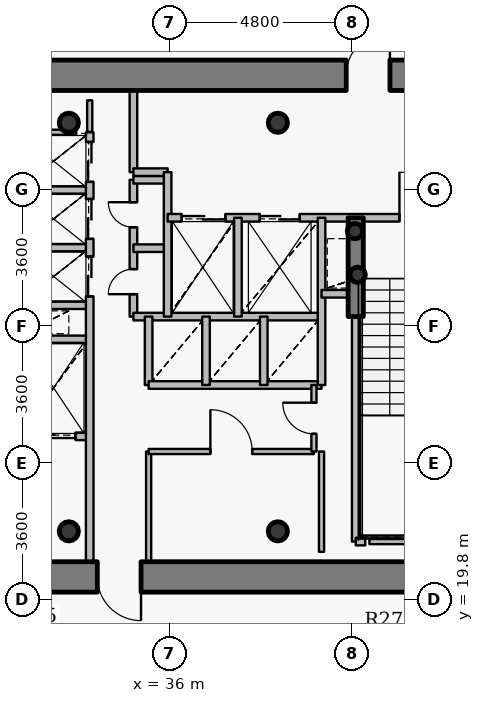
"""IFC4 building model, lengths in metres.
Left out: names, types, materials, properties, quantities, classifications, styles, units other than length and angle.
Written with IfcOpenShell. Run it as: python <this file> out.ifc"""

import sys

from ifc_helpers import new_model, si_unit, direction, frame, frame_2d, origin, origin_2d, place, context, subcontext, project, spatial, rectangle, hollow_circle, extrude, source, transform, mapped, element, fill, save


model = new_model("IFC4")
c1 = context("Model", 3, precision=1e-05, world=origin(), true_north=direction((0.0, 1.0)))
c2 = subcontext(c1, "Body", "Model", "MODEL_VIEW")
j1 = project(units=[si_unit("LENGTHUNIT", "METRE"), si_unit("PLANEANGLEUNIT", "RADIAN")], contexts=[c1])
p1 = place(None, origin())
s1 = spatial("IfcSite", under=j1, at=p1, CompositionType="ELEMENT")
p2 = place(p1, origin())
s2 = spatial("IfcBuilding", under=s1, at=p2, CompositionType="ELEMENT")
p3 = place(p2, frame((0.0, 0.0, 159.9)))
s3 = spatial("IfcBuildingStorey", under=s2, at=p3, CompositionType="ELEMENT", Elevation=159.9)
for number, where, z_axis, x_axis in (
    (1, (33.35, 21.6, 0.0), (0.0, 0.0, 1.0), (1.0, 0.0, 0.0)),
    (2, (38.85, 21.6, 0.0), (0.0, 0.0, 1.0), (1.0, 0.0, 0.0)),
    (3, (38.85, 32.35, 0.0), (0.0, 0.0, 1.0), (1.0, 0.0, 0.0)),
    (4, (33.35, 32.35, 0.0), (0.0, 0.0, 1.0), (1.0, 0.0, 0.0)),
):
    element("IfcColumn", number, at=place(p3, frame(where, z_axis=z_axis, x_axis=x_axis)), inside=s3, PredefinedType="COLUMN", context=c2, shape_type="SweptSolid", body=[
        extrude(hollow_circle(Radius=0.254, WallThickness=0.02, at=origin_2d()), origin(), (0.0, 0.0, 1.0), 3.75),
    ])
for number, where, z_axis, x_axis in (
    (5, (40.95, 28.35, 0.0), (0.0, 0.0, 1.0), (1.0, 0.0, 0.0)),
    (6, (40.88, 29.5, 0.0), (0.0, 0.0, 1.0), (1.0, 0.0, 0.0)),
):
    element("IfcColumn", number, at=place(p3, frame(where, z_axis=z_axis, x_axis=x_axis)), inside=s3, PredefinedType="COLUMN", context=c2, shape_type="SweptSolid", body=[
        extrude(hollow_circle(Radius=0.203, WallThickness=0.016, at=origin_2d()), origin(), (0.0, 0.0, 1.0), 3.75),
    ])
p4 = place(p3, frame((27.2, 33.6, 0.0), z_axis=(0.0, 0.0, 1.0), x_axis=(1.0, 0.0, 0.0)))
e7 = element("IfcWall", 7, at=p4, inside=s3, PredefinedType="SHEAR", context=c2, shape_type="SweptSolid", body=[
    extrude(rectangle(XDim=17.6, YDim=0.8, at=frame_2d((8.8, 0.0))), origin(), (0.0, 0.0, 1.0), 2.95),
])
p5 = place(p4, frame((13.45, 0.0, 0.0)))
e8 = element("IfcOpeningElement", 8, at=p5, cuts=e7, PredefinedType="OPENING", context=c2, shape_type="SweptSolid", body=[
    extrude(rectangle(XDim=1.15, YDim=2.15, at=origin_2d()), frame((0.575, 0.41, 1.075), z_axis=(0.0, -1.0, 0.0), x_axis=(1.0, 0.0, 0.0)), (0.0, 0.0, 1.0), 0.82),
])
p6 = place(p3, frame((44.8, 20.4, 0.0), z_axis=(0.0, 0.0, 1.0), x_axis=(-1.0, 0.0, 0.0)))
e9 = element("IfcWall", 9, at=p6, inside=s3, PredefinedType="SHEAR", context=c2, shape_type="SweptSolid", body=[
    extrude(rectangle(XDim=17.6, YDim=0.8, at=frame_2d((8.8, 0.0))), origin(), (0.0, 0.0, 1.0), 2.95),
])
p7 = place(p6, frame((9.55, 0.0, 0.0)))
e10 = element("IfcOpeningElement", 10, at=p7, cuts=e9, PredefinedType="OPENING", context=c2, shape_type="SweptSolid", body=[
    extrude(rectangle(XDim=1.15, YDim=2.15, at=origin_2d()), frame((0.575, 0.41, 1.075), z_axis=(0.0, -1.0, 0.0), x_axis=(1.0, 0.0, 0.0)), (0.0, 0.0, 1.0), 0.82),
])
p8 = place(p3, frame((40.9, 27.25, 0.0), z_axis=(0.0, 0.0, 1.0), x_axis=(0.0, 1.0, 0.0)))
e11 = element("IfcWall", 11, at=p8, inside=s3, PredefinedType="SHEAR", context=c2, shape_type="SweptSolid", body=[
    extrude(rectangle(XDim=2.6, YDim=0.4, at=frame_2d((1.3, 0.0))), origin(), (0.0, 0.0, 1.0), 3.1),
])
p9 = place(p3, frame((32.0, 24.1, 0.0), z_axis=(0.0, 0.0, 1.0), x_axis=(1.0, 0.0, 0.0)))
e12 = element("IfcWall", 12, at=p9, inside=s3, PredefinedType="PARTITIONING", context=c2, shape_type="SweptSolid", body=[
    extrude(rectangle(XDim=1.9, YDim=0.2, at=frame_2d((0.95, 0.0))), origin(), (0.0, 0.0, 1.0), 3.085),
])
p10 = place(p9, frame((0.375, 0.0, 0.0)))
e13 = element("IfcOpeningElement", 13, at=p10, cuts=e12, PredefinedType="OPENING", context=c2, shape_type="SweptSolid", body=[
    extrude(rectangle(XDim=1.15, YDim=2.15, at=origin_2d()), frame((0.575, 0.11, 1.075), z_axis=(0.0, -1.0, 0.0), x_axis=(1.0, 0.0, 0.0)), (0.0, 0.0, 1.0), 0.22),
])
for number, where, z_axis, x_axis in (
    (14, (32.0, 26.65, 0.0), (0.0, 0.0, 1.0), (1.0, 0.0, 0.0)),
    (15, (32.0, 27.55, 0.0), (0.0, 0.0, 1.0), (1.0, 0.0, 0.0)),
    (16, (32.0, 29.06, 0.0), (0.0, 0.0, 1.0), (1.0, 0.0, 0.0)),
    (17, (32.0, 30.58, 0.0), (0.0, 0.0, 1.0), (1.0, 0.0, 0.0)),
):
    element("IfcWall", number, at=place(p3, frame(where, z_axis=z_axis, x_axis=x_axis)), inside=s3, PredefinedType="PARTITIONING", context=c2, shape_type="SweptSolid", body=[
        extrude(rectangle(XDim=1.9, YDim=0.2, at=frame_2d((0.95, 0.0))), origin(), (0.0, 0.0, 1.0), 3.085),
    ])
p11 = place(p3, frame((33.9, 20.8, 0.0), z_axis=(0.0, 0.0, 1.0), x_axis=(0.0, 1.0, 0.0)))
e18 = element("IfcWall", 18, at=p11, inside=s3, PredefinedType="PARTITIONING", context=c2, shape_type="SweptSolid", body=[
    extrude(rectangle(XDim=11.3, YDim=0.2, at=frame_2d((5.65, 0.0))), origin(), (0.0, 0.0, 1.0), 3.085),
])
p12 = place(p11, frame((6.98, 0.0, 0.0)))
e19 = element("IfcOpeningElement", 19, at=p12, cuts=e18, PredefinedType="OPENING", context=c2, shape_type="SweptSolid", body=[
    extrude(rectangle(XDim=1.05, YDim=2.15, at=origin_2d()), frame((0.525, 0.11, 1.075), z_axis=(0.0, -1.0, 0.0), x_axis=(1.0, 0.0, 0.0)), (0.0, 0.0, 1.0), 0.22),
])
p13 = place(p11, frame((8.495, 0.0, 0.0)))
e20 = element("IfcOpeningElement", 20, at=p13, cuts=e18, PredefinedType="OPENING", context=c2, shape_type="SweptSolid", body=[
    extrude(rectangle(XDim=1.05, YDim=2.15, at=origin_2d()), frame((0.525, 0.11, 1.075), z_axis=(0.0, -1.0, 0.0), x_axis=(1.0, 0.0, 0.0)), (0.0, 0.0, 1.0), 0.22),
])
p14 = place(p11, frame((9.995, 0.0, 0.0)))
e21 = element("IfcOpeningElement", 21, at=p14, cuts=e18, PredefinedType="OPENING", context=c2, shape_type="SweptSolid", body=[
    extrude(rectangle(XDim=1.05, YDim=2.15, at=origin_2d()), frame((0.525, 0.11, 1.075), z_axis=(0.0, -1.0, 0.0), x_axis=(1.0, 0.0, 0.0)), (0.0, 0.0, 1.0), 0.22),
])
p15 = place(p3, frame((35.05, 27.25, 0.0), z_axis=(0.0, 0.0, 1.0), x_axis=(0.0, 1.0, 0.0)))
e22 = element("IfcWall", 22, at=p15, inside=s3, PredefinedType="PARTITIONING", context=c2, shape_type="SweptSolid", body=[
    extrude(rectangle(XDim=3.6, YDim=0.2, at=frame_2d((1.8, 0.0))), origin(), (0.0, 0.0, 1.0), 3.5),
])
p16 = place(p15, frame((0.59, 0.0, 0.0)))
e23 = element("IfcOpeningElement", 23, at=p16, cuts=e22, PredefinedType="OPENING", context=c2, shape_type="SweptSolid", body=[
    extrude(rectangle(XDim=0.66, YDim=2.05, at=origin_2d()), frame((0.33, 0.11, 1.025), z_axis=(0.0, -1.0, 0.0), x_axis=(1.0, 0.0, 0.0)), (0.0, 0.0, 1.0), 0.22),
])
p17 = place(p15, frame((2.35, 0.0, 0.0)))
e24 = element("IfcOpeningElement", 24, at=p17, cuts=e22, PredefinedType="OPENING", context=c2, shape_type="SweptSolid", body=[
    extrude(rectangle(XDim=0.66, YDim=2.05, at=origin_2d()), frame((0.33, 0.11, 1.025), z_axis=(0.0, -1.0, 0.0), x_axis=(1.0, 0.0, 0.0)), (0.0, 0.0, 1.0), 0.22),
])
p18 = place(p3, frame((35.05, 27.25, 0.0), z_axis=(0.0, 0.0, 1.0), x_axis=(1.0, 0.0, 0.0)))
e25 = element("IfcWall", 25, at=p18, inside=s3, PredefinedType="PARTITIONING", context=c2, shape_type="SweptSolid", body=[
    extrude(rectangle(XDim=4.95, YDim=0.2, at=frame_2d((2.475, 0.0))), origin(), (0.0, 0.0, 1.0), 3.085),
])
for number, where, z_axis, x_axis in (
    (26, (35.05, 29.05, 0.0), (0.0, 0.0, 1.0), (1.0, 0.0, 0.0)),
    (27, (35.05, 30.85, 0.0), (0.0, 0.0, 1.0), (1.0, 0.0, 0.0)),
):
    element("IfcWall", number, at=place(p3, frame(where, z_axis=z_axis, x_axis=x_axis)), inside=s3, PredefinedType="PARTITIONING", context=c2, shape_type="SweptSolid", body=[
        extrude(rectangle(XDim=0.9, YDim=0.2, at=frame_2d((0.45, 0.0))), origin(), (0.0, 0.0, 1.0), 3.5),
    ])
p19 = place(p3, frame((35.05, 31.05, 0.0), z_axis=(0.0, 0.0, 1.0), x_axis=(0.0, 1.0, 0.0)))
e28 = element("IfcWall", 28, at=p19, inside=s3, PredefinedType="PARTITIONING", context=c2, shape_type="SweptSolid", body=[
    extrude(rectangle(XDim=2.15, YDim=0.2, at=frame_2d((1.075, 0.0))), origin(), (0.0, 0.0, 1.0), 3.085),
])
p20 = place(p3, frame((35.05, 31.05, 0.0), z_axis=(0.0, 0.0, 1.0), x_axis=(1.0, 0.0, 0.0)))
e29 = element("IfcWall", 29, at=p20, inside=s3, PredefinedType="PARTITIONING", context=c2, shape_type="SweptSolid", body=[
    extrude(rectangle(XDim=0.9, YDim=0.2, at=frame_2d((0.45, 0.0))), origin(), (0.0, 0.0, 1.0), 3.5),
])
p21 = place(p3, frame((35.45, 20.8, 0.0), z_axis=(0.0, 0.0, 1.0), x_axis=(0.0, 1.0, 0.0)))
e30 = element("IfcWall", 30, at=p21, inside=s3, PredefinedType="PARTITIONING", context=c2, shape_type="SweptSolid", body=[
    extrude(rectangle(XDim=2.9, YDim=0.135, at=frame_2d((1.45, 0.0))), origin(), (0.0, 0.0, 1.0), 3.085),
])
p22 = place(p3, frame((35.45, 23.7, 0.0), z_axis=(0.0, 0.0, 1.0), x_axis=(1.0, 0.0, 0.0)))
e31 = element("IfcWall", 31, at=p22, inside=s3, PredefinedType="PARTITIONING", context=c2, shape_type="SweptSolid", body=[
    extrude(rectangle(XDim=4.35, YDim=0.135, at=frame_2d((2.175, 0.0))), origin(), (0.0, 0.0, 1.0), 3.085),
])
p23 = place(p22, frame((1.625, 0.0, 0.0)))
e32 = element("IfcOpeningElement", 32, at=p23, cuts=e31, PredefinedType="OPENING", context=c2, shape_type="SweptSolid", body=[
    extrude(rectangle(XDim=1.1, YDim=2.15, at=origin_2d()), frame((0.55, 0.078, 1.075), z_axis=(0.0, -1.0, 0.0), x_axis=(1.0, 0.0, 0.0)), (0.0, 0.0, 1.0), 0.155),
])
p24 = place(p3, frame((35.45, 25.45, 0.0), z_axis=(0.0, 0.0, 1.0), x_axis=(0.0, 1.0, 0.0)))
e33 = element("IfcWall", 33, at=p24, inside=s3, PredefinedType="PARTITIONING", context=c2, shape_type="SweptSolid", body=[
    extrude(rectangle(XDim=1.8, YDim=0.2, at=frame_2d((0.9, 0.0))), origin(), (0.0, 0.0, 1.0), 3.5),
])
p25 = place(p3, frame((35.45, 25.45, 0.0), z_axis=(0.0, 0.0, 1.0), x_axis=(1.0, 0.0, 0.0)))
e34 = element("IfcWall", 34, at=p25, inside=s3, PredefinedType="PARTITIONING", context=c2, shape_type="SweptSolid", body=[
    extrude(rectangle(XDim=4.55, YDim=0.2, at=frame_2d((2.275, 0.0))), origin(), (0.0, 0.0, 1.0), 3.085),
])
p26 = place(p3, frame((35.95, 27.25, 0.0), z_axis=(0.0, 0.0, 1.0), x_axis=(0.0, 1.0, 0.0)))
e35 = element("IfcWall", 35, at=p26, inside=s3, PredefinedType="PARTITIONING", context=c2, shape_type="SweptSolid", body=[
    extrude(rectangle(XDim=3.8, YDim=0.2, at=frame_2d((1.9, 0.0))), origin(), (0.0, 0.0, 1.0), 3.5),
])
p27 = place(p3, frame((35.95, 29.85, 0.0), z_axis=(0.0, 0.0, 1.0), x_axis=(1.0, 0.0, 0.0)))
e36 = element("IfcWall", 36, at=p27, inside=s3, PredefinedType="PARTITIONING", context=c2, shape_type="SweptSolid", body=[
    extrude(rectangle(XDim=8.49, YDim=0.2, at=frame_2d((4.245, 0.0))), origin(), (0.0, 0.0, 1.0), 3.085),
])
p28 = place(p27, frame((6.1, 0.0, 0.0)))
e37 = element("IfcOpeningElement", 37, at=p28, cuts=e36, PredefinedType="OPENING", context=c2, shape_type="SweptSolid", body=[
    extrude(rectangle(XDim=1.2, YDim=2.15, at=origin_2d()), frame((0.6, 0.11, 1.075), z_axis=(0.0, -1.0, 0.0), x_axis=(1.0, 0.0, 0.0)), (0.0, 0.0, 1.0), 0.22),
])
p29 = place(p27, frame((0.37, 0.0, 0.0)))
e38 = element("IfcOpeningElement", 38, at=p29, cuts=e36, PredefinedType="OPENING", context=c2, shape_type="SweptSolid", body=[
    extrude(rectangle(XDim=1.15, YDim=2.15, at=origin_2d()), frame((0.575, 0.11, 1.075), z_axis=(0.0, -1.0, 0.0), x_axis=(1.0, 0.0, 0.0)), (0.0, 0.0, 1.0), 0.22),
])
p30 = place(p27, frame((2.425, 0.0, 0.0)))
e39 = element("IfcOpeningElement", 39, at=p30, cuts=e36, PredefinedType="OPENING", context=c2, shape_type="SweptSolid", body=[
    extrude(rectangle(XDim=1.05, YDim=2.15, at=origin_2d()), frame((0.525, 0.11, 1.075), z_axis=(0.0, -1.0, 0.0), x_axis=(1.0, 0.0, 0.0)), (0.0, 0.0, 1.0), 0.22),
])
p31 = place(p3, frame((36.96, 25.45, 0.0), z_axis=(0.0, 0.0, 1.0), x_axis=(0.0, 1.0, 0.0)))
e40 = element("IfcWall", 40, at=p31, inside=s3, PredefinedType="PARTITIONING", context=c2, shape_type="SweptSolid", body=[
    extrude(rectangle(XDim=1.8, YDim=0.2, at=frame_2d((0.9, 0.0))), origin(), (0.0, 0.0, 1.0), 3.5),
])
p32 = place(p3, frame((37.8, 27.25, 0.0), z_axis=(0.0, 0.0, 1.0), x_axis=(0.0, 1.0, 0.0)))
e41 = element("IfcWall", 41, at=p32, inside=s3, PredefinedType="PARTITIONING", context=c2, shape_type="SweptSolid", body=[
    extrude(rectangle(XDim=2.6, YDim=0.2, at=frame_2d((1.3, 0.0))), origin(), (0.0, 0.0, 1.0), 3.5),
])
p33 = place(p3, frame((38.48, 25.45, 0.0), z_axis=(0.0, 0.0, 1.0), x_axis=(0.0, 1.0, 0.0)))
e42 = element("IfcWall", 42, at=p33, inside=s3, PredefinedType="PARTITIONING", context=c2, shape_type="SweptSolid", body=[
    extrude(rectangle(XDim=1.8, YDim=0.2, at=frame_2d((0.9, 0.0))), origin(), (0.0, 0.0, 1.0), 3.5),
])
p34 = place(p3, frame((39.8, 23.7, 0.0), z_axis=(0.0, 0.0, 1.0), x_axis=(0.0, 1.0, 0.0)))
e43 = element("IfcWall", 43, at=p34, inside=s3, PredefinedType="PARTITIONING", context=c2, shape_type="SweptSolid", body=[
    extrude(rectangle(XDim=1.75, YDim=0.135, at=frame_2d((0.875, 0.0))), origin(), (0.0, 0.0, 1.0), 3.5),
])
p35 = place(p34, frame((0.465, 0.0, 0.0)))
e44 = element("IfcOpeningElement", 44, at=p35, cuts=e43, PredefinedType="OPENING", context=c2, shape_type="SweptSolid", body=[
    extrude(rectangle(XDim=0.82, YDim=2.1, at=origin_2d()), frame((0.41, 0.078, 1.05), z_axis=(0.0, -1.0, 0.0), x_axis=(1.0, 0.0, 0.0)), (0.0, 0.0, 1.0), 0.155),
])
p36 = place(p3, frame((40.0, 25.45, 0.0), z_axis=(0.0, 0.0, 1.0), x_axis=(0.0, 1.0, 0.0)))
e45 = element("IfcWall", 45, at=p36, inside=s3, PredefinedType="PARTITIONING", context=c2, shape_type="SweptSolid", body=[
    extrude(rectangle(XDim=4.4, YDim=0.2, at=frame_2d((2.2, 0.0))), origin(), (0.0, 0.0, 1.0), 3.5),
])
p37 = place(p3, frame((40.0, 27.85, 0.0), z_axis=(0.0, 0.0, 1.0), x_axis=(1.0, 0.0, 0.0)))
e46 = element("IfcWall", 46, at=p37, inside=s3, PredefinedType="PARTITIONING", context=c2, shape_type="SweptSolid", body=[
    extrude(rectangle(XDim=0.9, YDim=0.2, at=frame_2d((0.45, 0.0))), origin(), (0.0, 0.0, 1.0), 3.5),
])
p38 = place(p3, frame((40.9, 21.33, 0.0), z_axis=(0.0, 0.0, 1.0), x_axis=(0.0, 1.0, 0.0)))
e47 = element("IfcWall", 47, at=p38, inside=s3, PredefinedType="PARTITIONING", context=c2, shape_type="SweptSolid", body=[
    extrude(rectangle(XDim=5.91, YDim=0.2, at=frame_2d((2.955, 0.0))), origin(), (0.0, 0.0, 1.0), 3.035),
])
p39 = place(p3, frame((40.9, 21.33, 0.0), z_axis=(0.0, 0.0, 1.0), x_axis=(1.0, 0.0, 0.0)))
e48 = element("IfcWall", 48, at=p39, inside=s3, PredefinedType="PARTITIONING", context=c2, shape_type="SweptSolid", body=[
    extrude(rectangle(XDim=0.25, YDim=0.2, at=frame_2d((0.125, 0.0))), origin(), (0.0, 0.0, 1.0), 3.035),
])
p40 = place(p3, frame((44.08, 21.33, 0.0), z_axis=(0.0, 0.0, 1.0), x_axis=(-1.0, 0.0, 0.0)))
e49 = element("IfcWall", 49, at=p40, inside=s3, PredefinedType="PARTITIONING", context=c2, shape_type="SweptSolid", body=[
    extrude(rectangle(XDim=2.82, YDim=0.135, at=frame_2d((1.41, 0.0))), origin(), (0.0, 0.0, 1.0), 3.035),
])
p41 = place(p3, frame((32.36, 32.1, 0.0), z_axis=(0.0, 0.0, 1.0), x_axis=(1.0, 0.0, 0.0)))
e50 = element("IfcWall", 50, at=p41, inside=s3, PredefinedType="PARTITIONING", context=c2, shape_type="SweptSolid", body=[
    extrude(rectangle(XDim=1.18, YDim=0.135, at=frame_2d((0.59, 0.0))), origin(), (0.0, 0.0, 1.0), 3.085),
])
p42 = place(p3, frame((40.0, 23.7, 0.0), z_axis=(0.0, 0.0, 1.0), x_axis=(0.0, -1.0, 0.0)))
e51 = element("IfcWall", 51, at=p42, inside=s3, PredefinedType="PARTITIONING", context=c2, shape_type="SweptSolid", body=[
    extrude(rectangle(XDim=2.64, YDim=0.135, at=frame_2d((1.32, 0.0))), origin(), (0.0, 0.0, 1.0), 3.035),
])
p43 = place(p3, frame((33.9, 32.11, 0.0), z_axis=(0.0, 0.0, 1.0), x_axis=(0.0, 1.0, 0.0)))
e52 = element("IfcWall", 52, at=p43, inside=s3, PredefinedType="PARTITIONING", context=c2, shape_type="SweptSolid", body=[
    extrude(rectangle(XDim=0.83, YDim=0.135, at=frame_2d((0.415, 0.0))), origin(), (0.0, 0.0, 1.0), 3.085),
])
m1 = source(origin(), c2, "Body", "SweptSolid", [
    extrude(rectangle(XDim=1.15, YDim=2.15, at=origin_2d()), frame((0.575, 0.025, 1.075), z_axis=(0.0, -1.0, 0.0), x_axis=(1.0, 0.0, 0.0)), (0.0, 0.0, 1.0), 0.05),
])
p44 = place(p5, origin())
e53 = element("IfcDoor", 53, at=p44, inside=s3, OperationType="SINGLE_SWING_RIGHT", PredefinedType="DOOR", context=c2, shape_type="MappedRepresentation", body=[
    mapped(m1, transform((0.0, 0.0, 0.0), x_axis=(1.0, 0.0, 0.0), y_axis=(0.0, 1.0, 0.0), z_axis=(0.0, 0.0, 1.0), scale=1.0)),
])
fill(e8, e53)
p45 = place(p7, origin())
e54 = element("IfcDoor", 54, at=p45, inside=s3, OperationType="SINGLE_SWING_LEFT", PredefinedType="DOOR", context=c2, shape_type="MappedRepresentation", body=[
    mapped(m1, transform((0.0, 0.0, 0.0), x_axis=(1.0, 0.0, 0.0), y_axis=(0.0, 1.0, 0.0), z_axis=(0.0, 0.0, 1.0), scale=1.0)),
])
fill(e10, e54)
m2 = source(origin(), c2, "Body", "SweptSolid", [
    extrude(rectangle(XDim=1.2, YDim=2.15, at=origin_2d()), frame((0.6, 0.025, 1.075), z_axis=(0.0, -1.0, 0.0), x_axis=(1.0, 0.0, 0.0)), (0.0, 0.0, 1.0), 0.05),
])
p46 = place(p28, origin())
e55 = element("IfcDoor", 55, at=p46, inside=s3, OperationType="SINGLE_SWING_LEFT", PredefinedType="DOOR", context=c2, shape_type="MappedRepresentation", body=[
    mapped(m2, transform((0.0, 0.0, 0.0), x_axis=(1.0, 0.0, 0.0), y_axis=(0.0, 1.0, 0.0), z_axis=(0.0, 0.0, 1.0), scale=1.0)),
])
fill(e37, e55)
m3 = source(origin(), c2, "Body", "SweptSolid", [
    extrude(rectangle(XDim=1.15, YDim=2.15, at=origin_2d()), frame((0.575, 0.025, 1.075), z_axis=(0.0, -1.0, 0.0), x_axis=(1.0, 0.0, 0.0)), (0.0, 0.0, 1.0), 0.05),
])
p47 = place(p29, origin())
e56 = element("IfcDoor", 56, at=p47, inside=s3, OperationType="DOUBLE_DOOR_SLIDING", PredefinedType="USERDEFINED", context=c2, shape_type="MappedRepresentation", body=[
    mapped(m3, transform((0.0, 0.0, 0.0), x_axis=(1.0, 0.0, 0.0), y_axis=(0.0, 1.0, 0.0), z_axis=(0.0, 0.0, 1.0), scale=1.0)),
])
fill(e38, e56)
p48 = place(p10, origin())
e57 = element("IfcDoor", 57, at=p48, inside=s3, OperationType="DOUBLE_DOOR_SLIDING", PredefinedType="USERDEFINED", context=c2, shape_type="MappedRepresentation", body=[
    mapped(m3, transform((0.0, 0.0, 0.0), x_axis=(1.0, 0.0, 0.0), y_axis=(0.0, 1.0, 0.0), z_axis=(0.0, 0.0, 1.0), scale=1.0)),
])
fill(e13, e57)
m4 = source(origin(), c2, "Body", "SweptSolid", [
    extrude(rectangle(XDim=1.05, YDim=2.15, at=origin_2d()), frame((0.525, 0.025, 1.075), z_axis=(0.0, -1.0, 0.0), x_axis=(1.0, 0.0, 0.0)), (0.0, 0.0, 1.0), 0.05),
])
p49 = place(p30, origin())
e58 = element("IfcDoor", 58, at=p49, inside=s3, OperationType="DOUBLE_DOOR_SLIDING", PredefinedType="USERDEFINED", context=c2, shape_type="MappedRepresentation", body=[
    mapped(m4, transform((0.0, 0.0, 0.0), x_axis=(1.0, 0.0, 0.0), y_axis=(0.0, 1.0, 0.0), z_axis=(0.0, 0.0, 1.0), scale=1.0)),
])
fill(e39, e58)
p50 = place(p12, origin())
e59 = element("IfcDoor", 59, at=p50, inside=s3, OperationType="DOUBLE_DOOR_SLIDING", PredefinedType="USERDEFINED", context=c2, shape_type="MappedRepresentation", body=[
    mapped(m4, transform((0.0, 0.0, 0.0), x_axis=(1.0, 0.0, 0.0), y_axis=(0.0, 1.0, 0.0), z_axis=(0.0, 0.0, 1.0), scale=1.0)),
])
fill(e19, e59)
p51 = place(p13, origin())
e60 = element("IfcDoor", 60, at=p51, inside=s3, OperationType="DOUBLE_DOOR_SLIDING", PredefinedType="USERDEFINED", context=c2, shape_type="MappedRepresentation", body=[
    mapped(m4, transform((0.0, 0.0, 0.0), x_axis=(1.0, 0.0, 0.0), y_axis=(0.0, 1.0, 0.0), z_axis=(0.0, 0.0, 1.0), scale=1.0)),
])
fill(e20, e60)
p52 = place(p14, origin())
e61 = element("IfcDoor", 61, at=p52, inside=s3, OperationType="DOUBLE_DOOR_SLIDING", PredefinedType="USERDEFINED", context=c2, shape_type="MappedRepresentation", body=[
    mapped(m4, transform((0.0, 0.0, 0.0), x_axis=(1.0, 0.0, 0.0), y_axis=(0.0, 1.0, 0.0), z_axis=(0.0, 0.0, 1.0), scale=1.0)),
])
fill(e21, e61)
m5 = source(origin(), c2, "Body", "SweptSolid", [
    extrude(rectangle(XDim=0.66, YDim=2.05, at=origin_2d()), frame((0.33, 0.025, 1.025), z_axis=(0.0, -1.0, 0.0), x_axis=(1.0, 0.0, 0.0)), (0.0, 0.0, 1.0), 0.05),
])
p53 = place(p16, origin())
e62 = element("IfcDoor", 62, at=p53, inside=s3, OperationType="SINGLE_SWING_LEFT", PredefinedType="USERDEFINED", context=c2, shape_type="MappedRepresentation", body=[
    mapped(m5, transform((0.0, 0.0, 0.0), x_axis=(1.0, 0.0, 0.0), y_axis=(0.0, 1.0, 0.0), z_axis=(0.0, 0.0, 1.0), scale=1.0)),
])
fill(e23, e62)
p54 = place(p17, origin())
e63 = element("IfcDoor", 63, at=p54, inside=s3, OperationType="SINGLE_SWING_RIGHT", PredefinedType="USERDEFINED", context=c2, shape_type="MappedRepresentation", body=[
    mapped(m5, transform((0.0, 0.0, 0.0), x_axis=(1.0, 0.0, 0.0), y_axis=(0.0, 1.0, 0.0), z_axis=(0.0, 0.0, 1.0), scale=1.0)),
])
fill(e24, e63)
m6 = source(origin(), c2, "Body", "SweptSolid", [
    extrude(rectangle(XDim=1.1, YDim=2.15, at=origin_2d()), frame((0.55, 0.025, 1.075), z_axis=(0.0, -1.0, 0.0), x_axis=(1.0, 0.0, 0.0)), (0.0, 0.0, 1.0), 0.05),
])
p55 = place(p23, origin())
e64 = element("IfcDoor", 64, at=p55, inside=s3, OperationType="SINGLE_SWING_LEFT", PredefinedType="DOOR", context=c2, shape_type="MappedRepresentation", body=[
    mapped(m6, transform((0.0, 0.0, 0.0), x_axis=(1.0, 0.0, 0.0), y_axis=(0.0, 1.0, 0.0), z_axis=(0.0, 0.0, 1.0), scale=1.0)),
])
fill(e32, e64)
m7 = source(origin(), c2, "Body", "SweptSolid", [
    extrude(rectangle(XDim=0.82, YDim=2.1, at=origin_2d()), frame((0.41, 0.025, 1.05), z_axis=(0.0, -1.0, 0.0), x_axis=(1.0, 0.0, 0.0)), (0.0, 0.0, 1.0), 0.05),
])
p56 = place(p35, origin())
e65 = element("IfcDoor", 65, at=p56, inside=s3, OperationType="SINGLE_SWING_RIGHT", PredefinedType="DOOR", context=c2, shape_type="MappedRepresentation", body=[
    mapped(m7, transform((0.0, 0.0, 0.0), x_axis=(1.0, 0.0, 0.0), y_axis=(0.0, 1.0, 0.0), z_axis=(0.0, 0.0, 1.0), scale=1.0)),
])
fill(e44, e65)
save(model, sys.argv[1])
